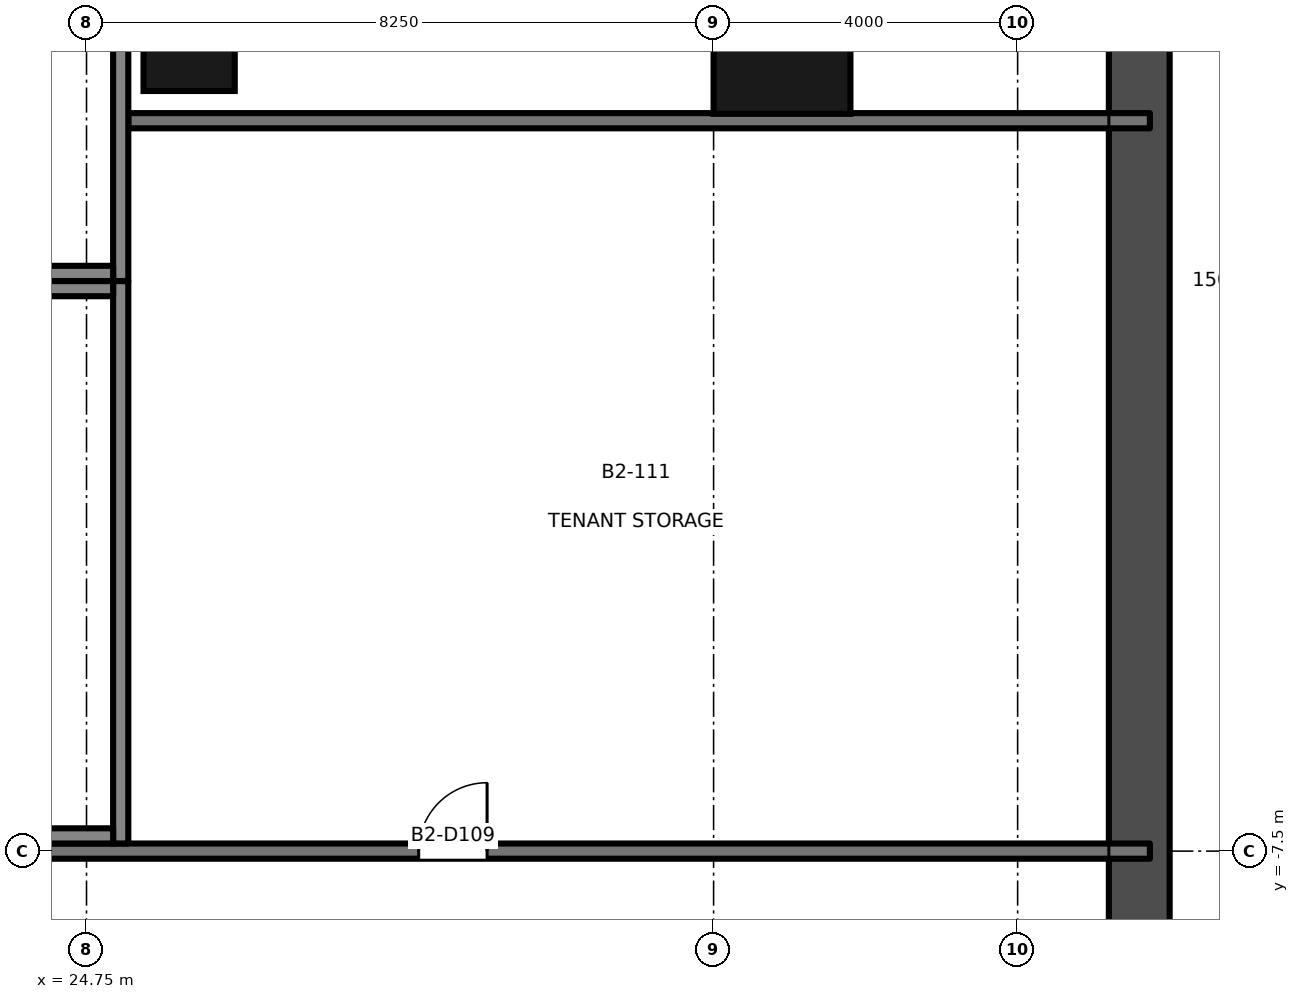
"""IFC4 building model, lengths in metres.
Left out: names, types, materials, properties, quantities, classifications, styles, units other than length and angle.
Written with IfcOpenShell. Run it as: python <this file> out.ifc"""

import sys

from ifc_helpers import new_model, si_unit, direction, frame, frame_2d, origin, origin_2d, place, context, subcontext, project, spatial, rectangle, extrude, element, fill, save


model = new_model("IFC4")
c1 = context("Model", 3, precision=1e-05, world=origin(), true_north=direction((0.0, 1.0)))
c2 = subcontext(c1, "Body", "Model", "MODEL_VIEW")
j1 = project(units=[si_unit("LENGTHUNIT", "METRE"), si_unit("PLANEANGLEUNIT", "RADIAN")], contexts=[c1])
p1 = place(None, origin())
s1 = spatial("IfcSite", under=j1, at=p1, CompositionType="ELEMENT")
p2 = place(p1, origin())
s2 = spatial("IfcBuilding", under=s1, at=p2, CompositionType="ELEMENT")
p3 = place(p2, frame((0.0, 0.0, -9.5)))
s3 = spatial("IfcBuildingStorey", under=s2, at=p3, CompositionType="ELEMENT", Elevation=-9.5)
p4 = place(p3, frame((38.6, -38.7, -0.2), z_axis=(0.0, 0.0, 1.0), x_axis=(0.0, 1.0, 0.0)))
e1 = element("IfcWall", 1, at=p4, inside=s3, PredefinedType="SOLIDWALL", context=c2, shape_type="SweptSolid", body=[
    extrude(rectangle(XDim=51.9, YDim=0.8, at=frame_2d((25.95, 0.0))), origin(), (0.0, 0.0, 1.0), 4.0),
])
p5 = place(p3, frame((33.9, 3.1, -0.2), z_axis=(0.0, 0.0, 1.0), x_axis=(0.0, 1.0, 0.0)))
e2 = element("IfcColumn", 2, at=p5, inside=s3, PredefinedType="COLUMN", context=c2, shape_type="SweptSolid", body=[
    extrude(rectangle(XDim=1.8, YDim=1.8, at=origin_2d()), origin(), (0.0, 0.0, 1.0), 4.0),
])
p6 = place(p3, frame((26.1, 3.1, -0.2), z_axis=(0.0, 0.0, 1.0), x_axis=(1.0, 0.0, 0.0)))
e3 = element("IfcColumn", 3, at=p6, inside=s3, PredefinedType="COLUMN", context=c2, shape_type="SweptSolid", body=[
    extrude(rectangle(XDim=1.2, YDim=1.2, at=origin_2d()), origin(), (0.0, 0.0, 1.0), 4.0),
])
p7 = place(p3, frame((25.2, -7.4, -0.2), z_axis=(0.0, 0.0, 1.0), x_axis=(0.0, 1.0, 0.0)))
e4 = element("IfcWall", 4, at=p7, inside=s3, PredefinedType="SHEAR", context=c2, shape_type="SweptSolid", body=[
    extrude(rectangle(XDim=7.4, YDim=0.2, at=frame_2d((3.7, 0.0))), origin(), (0.0, 0.0, 1.0), 4.0),
])
for number, where, z_axis, x_axis in (
    (5, (20.6, -0.1, -0.2), (0.0, 0.0, 1.0), (1.0, 0.0, 0.0)),
    (6, (20.6, -7.3, -0.2), (0.0, 0.0, 1.0), (1.0, 0.0, 0.0)),
):
    element("IfcWall", number, at=place(p3, frame(where, z_axis=z_axis, x_axis=x_axis)), inside=s3, PredefinedType="SHEAR", context=c2, shape_type="SweptSolid", body=[
        extrude(rectangle(XDim=4.5, YDim=0.2, at=frame_2d((2.25, 0.0))), origin(), (0.0, 0.0, 1.0), 4.0),
    ])
p8 = place(p3, frame((25.2, 0.0, -0.2), z_axis=(0.0, 0.0, 1.0), x_axis=(0.0, 1.0, 0.0)))
e7 = element("IfcWall", 7, at=p8, inside=s3, PredefinedType="SHEAR", context=c2, shape_type="SweptSolid", body=[
    extrude(rectangle(XDim=7.4, YDim=0.2, at=frame_2d((3.7, 0.0))), origin(), (0.0, 0.0, 1.0), 4.0),
])
p9 = place(p3, frame((20.6, 0.1, -0.2), z_axis=(0.0, 0.0, 1.0), x_axis=(1.0, 0.0, 0.0)))
e8 = element("IfcWall", 8, at=p9, inside=s3, PredefinedType="SHEAR", context=c2, shape_type="SweptSolid", body=[
    extrude(rectangle(XDim=4.5, YDim=0.2, at=frame_2d((2.25, 0.0))), origin(), (0.0, 0.0, 1.0), 4.0),
])
p10 = place(p3, frame((20.4, -7.5, 0.0), z_axis=(0.0, 0.0, 1.0), x_axis=(1.0, 0.0, 0.0)))
e9 = element("IfcWall", 9, at=p10, inside=s3, PredefinedType="PARTITIONING", context=c2, shape_type="SweptSolid", body=[
    extrude(rectangle(XDim=18.34, YDim=0.2, at=frame_2d((9.17, 0.0))), origin(), (0.0, 0.0, 1.0), 2.6),
])
p11 = place(p10, frame((8.72, 0.0, 0.0)))
e10 = element("IfcOpeningElement", 10, at=p11, cuts=e9, PredefinedType="OPENING", context=c2, shape_type="SweptSolid", body=[
    extrude(rectangle(XDim=0.9, YDim=2.1, at=frame_2d((0.45, 1.05))), frame((0.0, 0.111, 0.0), z_axis=(0.0, -1.0, 0.0), x_axis=(1.0, 0.0, 0.0)), (0.0, 0.0, 1.0), 0.221),
])
p12 = place(p3, frame((25.3, 2.109, 0.0), z_axis=(0.0, 0.0, 1.0), x_axis=(1.0, 0.0, 0.0)))
e11 = element("IfcWall", 11, at=p12, inside=s3, PredefinedType="PARTITIONING", context=c2, shape_type="SweptSolid", body=[
    extrude(rectangle(XDim=13.44, YDim=0.2, at=frame_2d((6.72, 0.0))), origin(), (0.0, 0.0, 1.0), 2.6),
])
p13 = place(p11, origin())
e12 = element("IfcDoor", 12, at=p13, inside=s3, OperationType="SINGLE_SWING_RIGHT", PredefinedType="DOOR", context=c2, shape_type="SweptSolid", body=[
    extrude(rectangle(XDim=0.9, YDim=2.1, at=frame_2d((0.45, 1.05))), frame((0.0, 0.025, 0.0), z_axis=(0.0, -1.0, 0.0), x_axis=(1.0, 0.0, 0.0)), (0.0, 0.0, 1.0), 0.05),
])
fill(e10, e12)
save(model, sys.argv[1])
